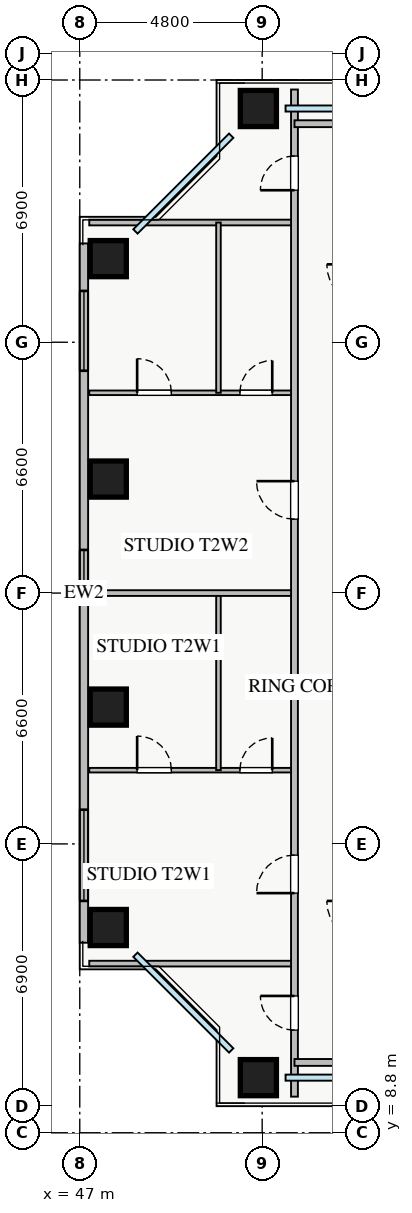
"""IFC4 building model, lengths in metres.
Left out: names, types, materials, properties, quantities, classifications, styles, units other than length and angle.
Written with IfcOpenShell. Run it as: python <this file> out.ifc"""

import sys

from ifc_helpers import new_model, si_unit, direction, frame, frame_2d, origin, origin_2d, place, context, subcontext, project, spatial, rectangle, extrude, source, transform, mapped, element, fill, save


model = new_model("IFC4")
c1 = context("Model", 3, precision=1e-05, world=origin(), true_north=direction((0.0, 1.0)))
c2 = subcontext(c1, "Body", "Model", "MODEL_VIEW")
j1 = project(units=[si_unit("LENGTHUNIT", "METRE"), si_unit("PLANEANGLEUNIT", "RADIAN")], contexts=[c1])
p1 = place(None, origin())
s1 = spatial("IfcSite", under=j1, at=p1, CompositionType="ELEMENT")
p2 = place(p1, origin())
s2 = spatial("IfcBuilding", under=s1, at=p2, CompositionType="ELEMENT")
p3 = place(p2, frame((0.0, 0.0, 63.25)))
s3 = spatial("IfcBuildingStorey", under=s2, at=p3, CompositionType="ELEMENT", Elevation=63.25)
m1 = source(origin(), c2, "Body", "SweptSolid", [
    extrude(rectangle(XDim=0.95, YDim=0.95, at=origin_2d()), origin(), (0.0, 0.0, 1.0), 3.25),
])
for number, where, z_axis, x_axis in (
    (1, (51.7, 10.25, 0.0), (0.0, 0.0, 1.0), (1.0, 0.0, 0.0)),
    (2, (51.7, 35.75, 0.0), (0.0, 0.0, 1.0), (1.0, 0.0, 0.0)),
    (3, (47.75, 14.2, 0.0), (0.0, 0.0, 1.0), (1.0, 0.0, 0.0)),
    (4, (47.75, 20.0, 0.0), (0.0, 0.0, 1.0), (1.0, 0.0, 0.0)),
    (5, (47.75, 26.0, 0.0), (0.0, 0.0, 1.0), (1.0, 0.0, 0.0)),
    (6, (47.75, 31.8, 0.0), (0.0, 0.0, 1.0), (1.0, 0.0, 0.0)),
):
    element("IfcColumn", number, at=place(p3, frame(where, z_axis=z_axis, x_axis=x_axis)), inside=s3, PredefinedType="COLUMN", context=c2, shape_type="MappedRepresentation", body=[
        mapped(m1, transform((0.0, 0.0, 0.0), x_axis=(1.0, 0.0, 0.0), y_axis=(0.0, 1.0, 0.0), z_axis=(0.0, 0.0, 1.0), scale=1.0)),
    ])
p4 = place(p3, frame((47.11, 13.8, 0.0), z_axis=(0.0, 0.0, 1.0), x_axis=(0.0, 1.0, 0.0)))
e7 = element("IfcWall", 7, at=p4, inside=s3, PredefinedType="STANDARD", context=c2, shape_type="SweptSolid", body=[
    extrude(rectangle(XDim=18.4, YDim=0.22, at=frame_2d((9.2, 0.0))), origin(), (0.0, 0.0, 1.0), 2.61),
])
p5 = place(p4, frame((1.1, 0.0, 0.9)))
e8 = element("IfcOpeningElement", 8, at=p5, cuts=e7, PredefinedType="OPENING", context=c2, shape_type="SweptSolid", body=[
    extrude(rectangle(XDim=2.4, YDim=1.48, at=frame_2d((1.2, 0.74))), frame((0.0, 0.12, 0.0), z_axis=(0.0, -1.0, 0.0), x_axis=(1.0, 0.0, 0.0)), (0.0, 0.0, 1.0), 0.24),
])
p6 = place(p4, frame((15.05, 0.0, 0.9)))
e9 = element("IfcOpeningElement", 9, at=p6, cuts=e7, PredefinedType="OPENING", context=c2, shape_type="SweptSolid", body=[
    extrude(rectangle(XDim=2.1, YDim=1.48, at=frame_2d((1.05, 0.74))), frame((0.0, 0.12, 0.0), z_axis=(0.0, -1.0, 0.0), x_axis=(1.0, 0.0, 0.0)), (0.0, 0.0, 1.0), 0.24),
])
p7 = place(p4, frame((9.435, 0.0, 0.9)))
e10 = element("IfcOpeningElement", 10, at=p7, cuts=e7, PredefinedType="OPENING", context=c2, shape_type="SweptSolid", body=[
    extrude(rectangle(XDim=0.9, YDim=1.2, at=frame_2d((0.45, 0.6))), frame((0.0, 0.12, 0.0), z_axis=(0.0, -1.0, 0.0), x_axis=(1.0, 0.0, 0.0)), (0.0, 0.0, 1.0), 0.24),
])
for number, where, z_axis, x_axis in (
    (11, (47.25, 32.75, 0.0), (0.0, 0.0, 1.0), (1.0, 0.0, 0.0)),
    (12, (47.25, 13.25, 0.0), (0.0, 0.0, 1.0), (1.0, 0.0, 0.0)),
):
    element("IfcWall", number, at=place(p3, frame(where, z_axis=z_axis, x_axis=x_axis)), inside=s3, PredefinedType="PARTITIONING", context=c2, shape_type="SweptSolid", body=[
        extrude(rectangle(XDim=5.4, YDim=0.15, at=frame_2d((2.7, 0.0))), origin(), (0.0, 0.0, 1.0), 3.07),
    ])
p8 = place(p3, frame((47.25, 18.34, 0.0), z_axis=(0.0, 0.0, 1.0), x_axis=(1.0, 0.0, 0.0)))
e13 = element("IfcWall", 13, at=p8, inside=s3, PredefinedType="PLUMBINGWALL", context=c2, shape_type="SweptSolid", body=[
    extrude(rectangle(XDim=5.4, YDim=0.12, at=frame_2d((2.7, 0.0))), origin(), (0.0, 0.0, 1.0), 2.771),
])
p9 = place(p8, frame((1.26, 0.0, 0.0)))
e14 = element("IfcOpeningElement", 14, at=p9, cuts=e13, PredefinedType="OPENING", context=c2, shape_type="SweptSolid", body=[
    extrude(rectangle(XDim=0.9, YDim=2.05, at=frame_2d((0.45, 1.025))), frame((0.0, 0.07, 0.0), z_axis=(0.0, -1.0, 0.0), x_axis=(1.0, 0.0, 0.0)), (0.0, 0.0, 1.0), 0.14),
])
p10 = place(p8, frame((3.965, 0.0, 0.0)))
e15 = element("IfcOpeningElement", 15, at=p10, cuts=e13, PredefinedType="OPENING", context=c2, shape_type="SweptSolid", body=[
    extrude(rectangle(XDim=0.85, YDim=2.05, at=frame_2d((0.425, 1.025))), frame((0.0, 0.07, 0.0), z_axis=(0.0, -1.0, 0.0), x_axis=(1.0, 0.0, 0.0)), (0.0, 0.0, 1.0), 0.14),
])
p11 = place(p3, frame((50.65, 18.34, 0.0), z_axis=(0.0, 0.0, 1.0), x_axis=(0.0, 1.0, 0.0)))
e16 = element("IfcWall", 16, at=p11, inside=s3, PredefinedType="PLUMBINGWALL", context=c2, shape_type="SweptSolid", body=[
    extrude(rectangle(XDim=4.66, YDim=0.12, at=frame_2d((2.33, 0.0))), origin(), (0.0, 0.0, 1.0), 3.07),
])
p12 = place(p3, frame((47.25, 28.27, 0.0), z_axis=(0.0, 0.0, 1.0), x_axis=(1.0, 0.0, 0.0)))
e17 = element("IfcWall", 17, at=p12, inside=s3, PredefinedType="PLUMBINGWALL", context=c2, shape_type="SweptSolid", body=[
    extrude(rectangle(XDim=5.4, YDim=0.12, at=frame_2d((2.7, 0.0))), origin(), (0.0, 0.0, 1.0), 3.07),
])
p13 = place(p12, frame((1.26, 0.0, 0.0)))
e18 = element("IfcOpeningElement", 18, at=p13, cuts=e17, PredefinedType="OPENING", context=c2, shape_type="SweptSolid", body=[
    extrude(rectangle(XDim=0.9, YDim=2.05, at=frame_2d((0.45, 1.025))), frame((0.0, 0.07, 0.0), z_axis=(0.0, -1.0, 0.0), x_axis=(1.0, 0.0, 0.0)), (0.0, 0.0, 1.0), 0.14),
])
p14 = place(p12, frame((3.965, 0.0, 0.0)))
e19 = element("IfcOpeningElement", 19, at=p14, cuts=e17, PredefinedType="OPENING", context=c2, shape_type="SweptSolid", body=[
    extrude(rectangle(XDim=0.85, YDim=2.05, at=frame_2d((0.425, 1.025))), frame((0.0, 0.07, 0.0), z_axis=(0.0, -1.0, 0.0), x_axis=(1.0, 0.0, 0.0)), (0.0, 0.0, 1.0), 0.14),
])
p15 = place(p3, frame((50.65, 28.27, 0.0), z_axis=(0.0, 0.0, 1.0), x_axis=(0.0, 1.0, 0.0)))
e20 = element("IfcWall", 20, at=p15, inside=s3, PredefinedType="PLUMBINGWALL", context=c2, shape_type="SweptSolid", body=[
    extrude(rectangle(XDim=4.48, YDim=0.12, at=frame_2d((2.24, 0.0))), origin(), (0.0, 0.0, 1.0), 3.07),
])
p16 = place(p3, frame((47.25, 23.0, 0.0), z_axis=(0.0, 0.0, 1.0), x_axis=(1.0, 0.0, 0.0)))
e21 = element("IfcWall", 21, at=p16, inside=s3, PredefinedType="PARTITIONING", context=c2, shape_type="SweptSolid", body=[
    extrude(rectangle(XDim=5.4, YDim=0.15, at=frame_2d((2.7, 0.0))), origin(), (0.0, 0.0, 1.0), 2.771),
])
p17 = place(p3, frame((52.65, 9.75, 0.0), z_axis=(0.0, 0.0, 1.0), x_axis=(0.0, 1.0, 0.0)))
e22 = element("IfcWall", 22, at=p17, inside=s3, PredefinedType="PARTITIONING", context=c2, shape_type="SweptSolid", body=[
    extrude(rectangle(XDim=26.5, YDim=0.18, at=frame_2d((13.25, 0.0))), origin(), (0.0, 0.0, 1.0), 3.07),
])
p18 = place(p17, frame((23.85, 0.0, 0.0)))
e23 = element("IfcOpeningElement", 23, at=p18, cuts=e22, PredefinedType="OPENING", context=c2, shape_type="SweptSolid", body=[
    extrude(rectangle(XDim=0.9, YDim=2.05, at=frame_2d((0.45, 1.025))), frame((0.0, 0.1, 0.0), z_axis=(0.0, -1.0, 0.0), x_axis=(1.0, 0.0, 0.0)), (0.0, 0.0, 1.0), 0.2),
])
p19 = place(p17, frame((1.75, 0.0, 0.0)))
e24 = element("IfcOpeningElement", 24, at=p19, cuts=e22, PredefinedType="OPENING", context=c2, shape_type="SweptSolid", body=[
    extrude(rectangle(XDim=0.9, YDim=2.05, at=frame_2d((0.45, 1.025))), frame((0.0, 0.1, 0.0), z_axis=(0.0, -1.0, 0.0), x_axis=(1.0, 0.0, 0.0)), (0.0, 0.0, 1.0), 0.2),
])
p20 = place(p17, frame((5.355, 0.0, 0.0)))
e25 = element("IfcOpeningElement", 25, at=p20, cuts=e22, PredefinedType="OPENING", context=c2, shape_type="SweptSolid", body=[
    extrude(rectangle(XDim=1.0, YDim=2.05, at=frame_2d((0.5, 1.025))), frame((0.0, 0.1, 0.0), z_axis=(0.0, -1.0, 0.0), x_axis=(1.0, 0.0, 0.0)), (0.0, 0.0, 1.0), 0.2),
])
p21 = place(p17, frame((15.195, 0.0, 0.0)))
e26 = element("IfcOpeningElement", 26, at=p21, cuts=e22, PredefinedType="OPENING", context=c2, shape_type="SweptSolid", body=[
    extrude(rectangle(XDim=1.0, YDim=2.05, at=frame_2d((0.5, 1.025))), frame((0.0, 0.1, 0.0), z_axis=(0.0, -1.0, 0.0), x_axis=(1.0, 0.0, 0.0)), (0.0, 0.0, 1.0), 0.2),
])
p22 = place(p3, frame((52.65, 35.35, 0.0), z_axis=(0.0, 0.0, 1.0), x_axis=(1.0, 0.0, 0.0)))
e27 = element("IfcWall", 27, at=p22, inside=s3, PredefinedType="PARTITIONING", context=c2, shape_type="SweptSolid", body=[
    extrude(rectangle(XDim=17.0, YDim=0.18, at=frame_2d((8.5, 0.0))), origin(), (0.0, 0.0, 1.0), 3.07),
])
p23 = place(p22, frame((3.825, 0.0, 0.0)))
e28 = element("IfcOpeningElement", 28, at=p23, cuts=e27, PredefinedType="OPENING", context=c2, shape_type="SweptSolid", body=[
    extrude(rectangle(XDim=0.9, YDim=2.05, at=frame_2d((0.45, 1.025))), frame((0.0, 0.1, 0.0), z_axis=(0.0, -1.0, 0.0), x_axis=(1.0, 0.0, 0.0)), (0.0, 0.0, 1.0), 0.2),
])
p24 = place(p22, frame((12.325, 0.0, 0.0)))
e29 = element("IfcOpeningElement", 29, at=p24, cuts=e27, PredefinedType="OPENING", context=c2, shape_type="SweptSolid", body=[
    extrude(rectangle(XDim=0.9, YDim=2.05, at=frame_2d((0.45, 1.025))), frame((0.0, 0.1, 0.0), z_axis=(0.0, -1.0, 0.0), x_axis=(1.0, 0.0, 0.0)), (0.0, 0.0, 1.0), 0.2),
])
p25 = place(p3, frame((52.65, 10.65, 0.0), z_axis=(0.0, 0.0, 1.0), x_axis=(1.0, 0.0, 0.0)))
e30 = element("IfcWall", 30, at=p25, inside=s3, PredefinedType="PARTITIONING", context=c2, shape_type="SweptSolid", body=[
    extrude(rectangle(XDim=17.0, YDim=0.18, at=frame_2d((8.5, 0.0))), origin(), (0.0, 0.0, 1.0), 3.07),
])
p26 = place(p25, frame((4.375, 0.0, 0.0)))
e31 = element("IfcOpeningElement", 31, at=p26, cuts=e30, PredefinedType="OPENING", context=c2, shape_type="SweptSolid", body=[
    extrude(rectangle(XDim=0.9, YDim=2.05, at=frame_2d((0.45, 1.025))), frame((0.0, 0.1, 0.0), z_axis=(0.0, -1.0, 0.0), x_axis=(1.0, 0.0, 0.0)), (0.0, 0.0, 1.0), 0.2),
])
p27 = place(p25, frame((12.875, 0.0, 0.0)))
e32 = element("IfcOpeningElement", 32, at=p27, cuts=e30, PredefinedType="OPENING", context=c2, shape_type="SweptSolid", body=[
    extrude(rectangle(XDim=0.9, YDim=2.05, at=frame_2d((0.45, 1.025))), frame((0.0, 0.1, 0.0), z_axis=(0.0, -1.0, 0.0), x_axis=(1.0, 0.0, 0.0)), (0.0, 0.0, 1.0), 0.2),
])
m2 = source(origin(), c2, "Body", "SweptSolid", [
    extrude(rectangle(XDim=2.4, YDim=1.48, at=frame_2d((1.2, 0.74))), frame((0.0, 0.03, 0.0), z_axis=(0.0, -1.0, 0.0), x_axis=(1.0, 0.0, 0.0)), (0.0, 0.0, 1.0), 0.06),
])
p28 = place(p5, origin())
e33 = element("IfcWindow", 33, at=p28, inside=s3, PartitioningType="TRIPLE_PANEL_VERTICAL", PredefinedType="WINDOW", context=c2, shape_type="MappedRepresentation", body=[
    mapped(m2, transform((0.0, 0.0, 0.0), x_axis=(1.0, 0.0, 0.0), y_axis=(0.0, 1.0, 0.0), z_axis=(0.0, 0.0, 1.0), scale=1.0)),
])
fill(e8, e33)
m3 = source(origin(), c2, "Body", "SweptSolid", [
    extrude(rectangle(XDim=2.1, YDim=1.48, at=frame_2d((1.05, 0.74))), frame((0.0, 0.03, 0.0), z_axis=(0.0, -1.0, 0.0), x_axis=(1.0, 0.0, 0.0)), (0.0, 0.0, 1.0), 0.06),
])
p29 = place(p6, origin())
e34 = element("IfcWindow", 34, at=p29, inside=s3, PartitioningType="TRIPLE_PANEL_VERTICAL", PredefinedType="WINDOW", context=c2, shape_type="MappedRepresentation", body=[
    mapped(m3, transform((0.0, 0.0, 0.0), x_axis=(1.0, 0.0, 0.0), y_axis=(0.0, 1.0, 0.0), z_axis=(0.0, 0.0, 1.0), scale=1.0)),
])
fill(e9, e34)
m4 = source(origin(), c2, "Body", "SweptSolid", [
    extrude(rectangle(XDim=0.9, YDim=2.05, at=frame_2d((0.45, 1.025))), frame((0.0, 0.025, 0.0), z_axis=(0.0, -1.0, 0.0), x_axis=(1.0, 0.0, 0.0)), (0.0, 0.0, 1.0), 0.05),
])
p30 = place(p9, origin())
e35 = element("IfcDoor", 35, at=p30, inside=s3, OperationType="SINGLE_SWING_LEFT", PredefinedType="DOOR", context=c2, shape_type="MappedRepresentation", body=[
    mapped(m4, transform((0.0, 0.0, 0.0), x_axis=(1.0, 0.0, 0.0), y_axis=(0.0, 1.0, 0.0), z_axis=(0.0, 0.0, 1.0), scale=1.0)),
])
fill(e14, e35)
m5 = source(origin(), c2, "Body", "SweptSolid", [
    extrude(rectangle(XDim=0.85, YDim=2.05, at=frame_2d((0.425, 1.025))), frame((0.0, 0.025, 0.0), z_axis=(0.0, -1.0, 0.0), x_axis=(1.0, 0.0, 0.0)), (0.0, 0.0, 1.0), 0.05),
])
p31 = place(p10, origin())
e36 = element("IfcDoor", 36, at=p31, inside=s3, OperationType="SINGLE_SWING_RIGHT", PredefinedType="DOOR", context=c2, shape_type="MappedRepresentation", body=[
    mapped(m5, transform((0.0, 0.0, 0.0), x_axis=(1.0, 0.0, 0.0), y_axis=(0.0, 1.0, 0.0), z_axis=(0.0, 0.0, 1.0), scale=1.0)),
])
fill(e15, e36)
p32 = place(p13, origin())
e37 = element("IfcDoor", 37, at=p32, inside=s3, OperationType="SINGLE_SWING_LEFT", PredefinedType="DOOR", context=c2, shape_type="MappedRepresentation", body=[
    mapped(m4, transform((0.0, 0.0, 0.0), x_axis=(1.0, 0.0, 0.0), y_axis=(0.0, 1.0, 0.0), z_axis=(0.0, 0.0, 1.0), scale=1.0)),
])
fill(e18, e37)
p33 = place(p14, origin())
e38 = element("IfcDoor", 38, at=p33, inside=s3, OperationType="SINGLE_SWING_RIGHT", PredefinedType="DOOR", context=c2, shape_type="MappedRepresentation", body=[
    mapped(m5, transform((0.0, 0.0, 0.0), x_axis=(1.0, 0.0, 0.0), y_axis=(0.0, 1.0, 0.0), z_axis=(0.0, 0.0, 1.0), scale=1.0)),
])
fill(e19, e38)
p34 = place(p18, origin())
e39 = element("IfcDoor", 39, at=p34, inside=s3, OperationType="SINGLE_SWING_LEFT", PredefinedType="DOOR", context=c2, shape_type="MappedRepresentation", body=[
    mapped(m4, transform((0.0, 0.0, 0.0), x_axis=(1.0, 0.0, 0.0), y_axis=(0.0, 1.0, 0.0), z_axis=(0.0, 0.0, 1.0), scale=1.0)),
])
fill(e23, e39)
p35 = place(p19, origin())
e40 = element("IfcDoor", 40, at=p35, inside=s3, OperationType="SINGLE_SWING_RIGHT", PredefinedType="DOOR", context=c2, shape_type="MappedRepresentation", body=[
    mapped(m4, transform((0.0, 0.0, 0.0), x_axis=(1.0, 0.0, 0.0), y_axis=(0.0, 1.0, 0.0), z_axis=(0.0, 0.0, 1.0), scale=1.0)),
])
fill(e24, e40)
m6 = source(origin(), c2, "Body", "SweptSolid", [
    extrude(rectangle(XDim=1.0, YDim=2.05, at=frame_2d((0.5, 1.025))), frame((0.0, 0.025, 0.0), z_axis=(0.0, -1.0, 0.0), x_axis=(1.0, 0.0, 0.0)), (0.0, 0.0, 1.0), 0.05),
])
p36 = place(p20, origin())
e41 = element("IfcDoor", 41, at=p36, inside=s3, OperationType="SINGLE_SWING_LEFT", PredefinedType="DOOR", context=c2, shape_type="MappedRepresentation", body=[
    mapped(m6, transform((0.0, 0.0, 0.0), x_axis=(1.0, 0.0, 0.0), y_axis=(0.0, 1.0, 0.0), z_axis=(0.0, 0.0, 1.0), scale=1.0)),
])
fill(e25, e41)
p37 = place(p21, origin())
e42 = element("IfcDoor", 42, at=p37, inside=s3, OperationType="SINGLE_SWING_RIGHT", PredefinedType="DOOR", context=c2, shape_type="MappedRepresentation", body=[
    mapped(m6, transform((0.0, 0.0, 0.0), x_axis=(1.0, 0.0, 0.0), y_axis=(0.0, 1.0, 0.0), z_axis=(0.0, 0.0, 1.0), scale=1.0)),
])
fill(e26, e42)
m7 = source(origin(), c2, "Body", "SweptSolid", [
    extrude(rectangle(XDim=0.9, YDim=1.2, at=frame_2d((0.45, 0.6))), frame((0.0, 0.03, 0.0), z_axis=(0.0, -1.0, 0.0), x_axis=(1.0, 0.0, 0.0)), (0.0, 0.0, 1.0), 0.06),
])
p38 = place(p7, origin())
e43 = element("IfcWindow", 43, at=p38, inside=s3, PartitioningType="SINGLE_PANEL", PredefinedType="WINDOW", context=c2, shape_type="MappedRepresentation", body=[
    mapped(m7, transform((0.0, 0.0, 0.0), x_axis=(1.0, 0.0, 0.0), y_axis=(0.0, 1.0, 0.0), z_axis=(0.0, 0.0, 1.0), scale=1.0)),
])
fill(e10, e43)
save(model, sys.argv[1])
